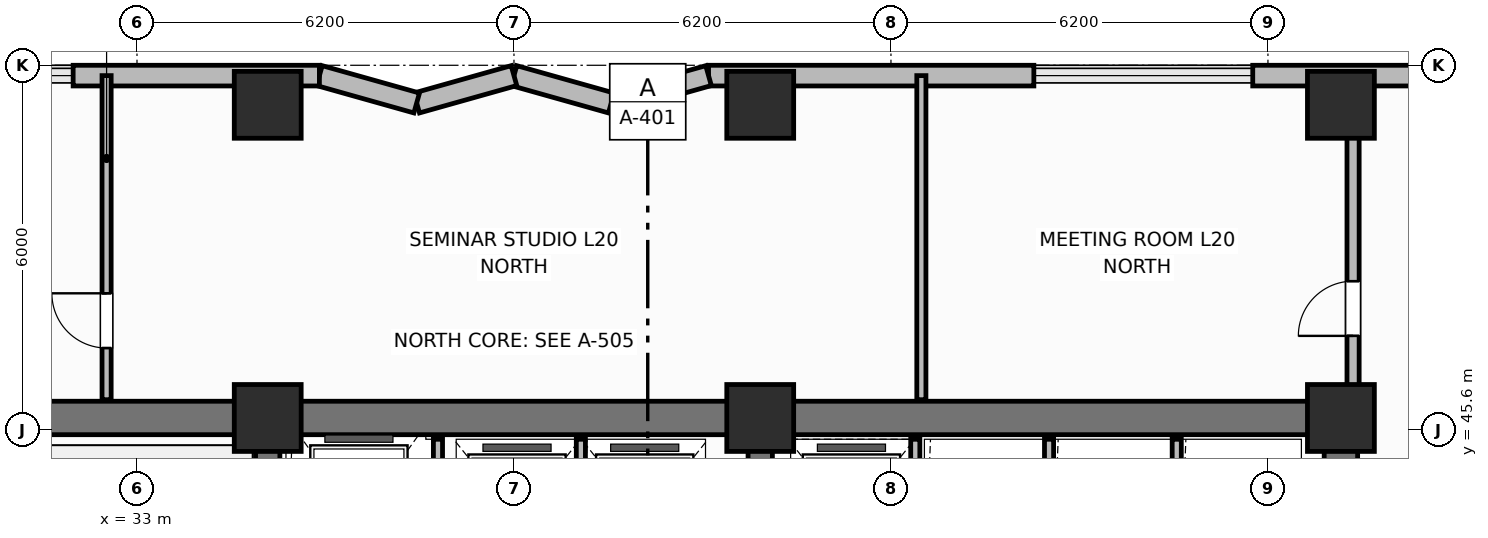
"""IFC4 building model, lengths in metres.
Left out: names, types, materials, properties, quantities, classifications, styles, units other than length and angle.
Written with IfcOpenShell. Run it as: python <this file> out.ifc"""

import sys

from ifc_helpers import new_model, si_unit, direction, frame, frame_2d, origin, origin_2d, place, context, subcontext, project, spatial, rectangle, extrude, element, fill, save


model = new_model("IFC4")
c1 = context("Model", 3, precision=1e-05, world=origin(), true_north=direction((0.0, 1.0)))
c2 = subcontext(c1, "Body", "Model", "MODEL_VIEW")
j1 = project(units=[si_unit("LENGTHUNIT", "METRE"), si_unit("PLANEANGLEUNIT", "RADIAN")], contexts=[c1])
p1 = place(None, origin())
s1 = spatial("IfcSite", under=j1, at=p1, CompositionType="ELEMENT")
p2 = place(p1, origin())
s2 = spatial("IfcBuilding", under=s1, at=p2, CompositionType="ELEMENT")
p3 = place(p2, frame((0.0, 0.0, 84.1)))
s3 = spatial("IfcBuildingStorey", under=s2, at=p3, CompositionType="ELEMENT", Elevation=84.1)
p4 = place(p3, frame((25.6, 45.8, 0.0), z_axis=(0.0, 0.0, 1.0), x_axis=(1.0, 0.0, 0.0)))
e1 = element("IfcWall", 1, at=p4, inside=s3, PredefinedType="SHEAR", context=c2, shape_type="SweptSolid", body=[
    extrude(rectangle(XDim=27.2, YDim=0.55, at=frame_2d((13.6, 0.0))), origin(), (0.0, 0.0, 1.0), 4.2),
])
p5 = place(p3, frame((52.8, 39.875, 0.0), z_axis=(0.0, 0.0, 1.0), x_axis=(0.0, 1.0, 0.0)))
e2 = element("IfcWall", 2, at=p5, inside=s3, PredefinedType="SHEAR", context=c2, shape_type="SweptSolid", body=[
    extrude(rectangle(XDim=5.65, YDim=0.55, at=frame_2d((2.825, 0.0))), origin(), (0.0, 0.0, 1.0), 4.2),
])
for number, where, z_axis, x_axis in (
    (3, (35.15, 39.875, 0.0), (0.0, 0.0, 1.0), (0.0, 1.0, 0.0)),
    (4, (43.25, 39.875, 0.0), (0.0, 0.0, 1.0), (0.0, 1.0, 0.0)),
):
    element("IfcWall", number, at=place(p3, frame(where, z_axis=z_axis, x_axis=x_axis)), inside=s3, PredefinedType="SHEAR", context=c2, shape_type="SweptSolid", body=[
        extrude(rectangle(XDim=5.65, YDim=0.4, at=frame_2d((2.825, 0.0))), origin(), (0.0, 0.0, 1.0), 4.2),
    ])
for number, where, z_axis, x_axis in (
    (5, (35.15, 45.8, 0.0), (0.0, 0.0, 1.0), (1.0, 0.0, 0.0)),
    (6, (43.25, 45.8, 0.0), (0.0, 0.0, 1.0), (1.0, 0.0, 0.0)),
    (7, (52.8, 45.8, 0.0), (0.0, 0.0, 1.0), (1.0, 0.0, 0.0)),
    (8, (35.15, 50.95, 0.0), (0.0, 0.0, 1.0), (1.0, 0.0, 0.0)),
    (9, (43.25, 50.95, 0.0), (0.0, 0.0, 1.0), (1.0, 0.0, 0.0)),
    (10, (52.8, 50.95, 0.0), (0.0, 0.0, 1.0), (1.0, 0.0, 0.0)),
):
    element("IfcColumn", number, at=place(p3, frame(where, z_axis=z_axis, x_axis=x_axis)), inside=s3, PredefinedType="COLUMN", context=c2, shape_type="SweptSolid", body=[
        extrude(rectangle(XDim=1.1, YDim=1.1, at=origin_2d()), origin(), (0.0, 0.0, 1.0), 4.2),
    ])
p6 = place(p3, frame((59.8, 51.43, 0.0), z_axis=(0.0, 0.0, 1.0), x_axis=(-1.0, 0.0, 0.0)))
e11 = element("IfcWall", 11, at=p6, inside=s3, PredefinedType="SOLIDWALL", context=c2, shape_type="SweptSolid", body=[
    extrude(rectangle(XDim=8.45, YDim=0.34, at=frame_2d((4.225, 0.0))), origin(), (0.0, 0.0, 1.0), 3.2),
])
p7 = place(p6, frame((1.887, 0.0, 0.95)))
e12 = element("IfcOpeningElement", 12, at=p7, cuts=e11, PredefinedType="OPENING", context=c2, shape_type="SweptSolid", body=[
    extrude(rectangle(XDim=1.1, YDim=1.65, at=frame_2d((0.55, 0.825))), frame((0.0, 0.18, 0.0), z_axis=(0.0, -1.0, 0.0), x_axis=(1.0, 0.0, 0.0)), (0.0, 0.0, 1.0), 0.36),
])
p8 = place(p3, frame((47.75, 51.43, 0.0), z_axis=(0.0, 0.0, 1.0), x_axis=(-1.0, 0.0, 0.0)))
e13 = element("IfcWall", 13, at=p8, inside=s3, PredefinedType="SOLIDWALL", context=c2, shape_type="SweptSolid", body=[
    extrude(rectangle(XDim=5.35, YDim=0.34, at=frame_2d((2.675, 0.0))), origin(), (0.0, 0.0, 1.0), 3.2),
])
p9 = place(p3, frame((42.4, 51.43, 0.0), z_axis=(0.0, 0.0, 1.0), x_axis=(-0.962652136636, -0.270741322725, 0.0)))
e14 = element("IfcWall", 14, at=p9, inside=s3, PredefinedType="SOLIDWALL", context=c2, shape_type="SweptSolid", body=[
    extrude(rectangle(XDim=1.662, YDim=0.34, at=frame_2d((0.831, 0.0))), origin(), (0.0, 0.0, 1.0), 3.2),
])
p10 = place(p3, frame((40.8, 50.98, 0.0), z_axis=(0.0, 0.0, 1.0), x_axis=(-0.962662902433, 0.270703040766, 0.0)))
e15 = element("IfcWall", 15, at=p10, inside=s3, PredefinedType="SOLIDWALL", context=c2, shape_type="SweptSolid", body=[
    extrude(rectangle(XDim=1.662, YDim=0.34, at=frame_2d((0.831, 0.0))), origin(), (0.0, 0.0, 1.0), 3.2),
])
p11 = place(p3, frame((39.2, 51.43, 0.0), z_axis=(0.0, 0.0, 1.0), x_axis=(-0.962652136636, -0.270741322725, 0.0)))
e16 = element("IfcWall", 16, at=p11, inside=s3, PredefinedType="SOLIDWALL", context=c2, shape_type="SweptSolid", body=[
    extrude(rectangle(XDim=1.662, YDim=0.34, at=frame_2d((0.831, 0.0))), origin(), (0.0, 0.0, 1.0), 3.2),
])
p12 = place(p3, frame((37.6, 50.98, 0.0), z_axis=(0.0, 0.0, 1.0), x_axis=(-0.962662902433, 0.270703040766, 0.0)))
e17 = element("IfcWall", 17, at=p12, inside=s3, PredefinedType="SOLIDWALL", context=c2, shape_type="SweptSolid", body=[
    extrude(rectangle(XDim=1.662, YDim=0.34, at=frame_2d((0.831, 0.0))), origin(), (0.0, 0.0, 1.0), 3.2),
])
p13 = place(p3, frame((36.0, 51.43, 0.0), z_axis=(0.0, 0.0, 1.0), x_axis=(-1.0, 0.0, 0.0)))
e18 = element("IfcWall", 18, at=p13, inside=s3, PredefinedType="SOLIDWALL", context=c2, shape_type="SweptSolid", body=[
    extrude(rectangle(XDim=4.05, YDim=0.34, at=frame_2d((2.025, 0.0))), origin(), (0.0, 0.0, 1.0), 3.2),
])
p14 = place(p3, frame((37.95, 42.6, 0.0), z_axis=(0.0, 0.0, 1.0), x_axis=(0.0, 1.0, 0.0)))
e19 = element("IfcWall", 19, at=p14, inside=s3, PredefinedType="PARTITIONING", context=c2, shape_type="SweptSolid", body=[
    extrude(rectangle(XDim=2.85, YDim=0.15, at=frame_2d((1.425, 0.0))), origin(), (0.0, 0.0, 1.0), 3.03),
])
for number, where, z_axis, x_axis in (
    (20, (40.3, 42.65, 0.0), (0.0, 0.0, 1.0), (0.0, 1.0, 0.0)),
    (21, (45.8, 42.65, 0.0), (0.0, 0.0, 1.0), (0.0, 1.0, 0.0)),
    (22, (48.0, 42.65, 0.0), (0.0, 0.0, 1.0), (0.0, 1.0, 0.0)),
    (23, (50.1, 42.65, 0.0), (0.0, 0.0, 1.0), (0.0, 1.0, 0.0)),
):
    element("IfcWall", number, at=place(p3, frame(where, z_axis=z_axis, x_axis=x_axis)), inside=s3, PredefinedType="PARTITIONING", context=c2, shape_type="SweptSolid", body=[
        extrude(rectangle(XDim=2.8, YDim=0.15, at=frame_2d((1.4, 0.0))), origin(), (0.0, 0.0, 1.0), 3.03),
    ])
p15 = place(p3, frame((32.5, 46.1, 0.0), z_axis=(0.0, 0.0, 1.0), x_axis=(0.0, 1.0, 0.0)))
e24 = element("IfcWall", 24, at=p15, inside=s3, PredefinedType="PARTITIONING", context=c2, shape_type="SweptSolid", body=[
    extrude(rectangle(XDim=5.33, YDim=0.15, at=frame_2d((2.665, 0.0))), origin(), (0.0, 0.0, 1.0), 3.03),
])
p16 = place(p15, frame((0.85, 0.0, 0.0)))
e25 = element("IfcOpeningElement", 25, at=p16, cuts=e24, PredefinedType="OPENING", context=c2, shape_type="SweptSolid", body=[
    extrude(rectangle(XDim=0.9, YDim=2.1, at=frame_2d((0.45, 1.05))), frame((0.0, 0.085, 0.0), z_axis=(0.0, -1.0, 0.0), x_axis=(1.0, 0.0, 0.0)), (0.0, 0.0, 1.0), 0.17),
])
p17 = place(p3, frame((45.9, 46.1, 0.0), z_axis=(0.0, 0.0, 1.0), x_axis=(0.0, 1.0, 0.0)))
e26 = element("IfcWall", 26, at=p17, inside=s3, PredefinedType="PARTITIONING", context=c2, shape_type="SweptSolid", body=[
    extrude(rectangle(XDim=5.33, YDim=0.15, at=frame_2d((2.665, 0.0))), origin(), (0.0, 0.0, 1.0), 3.03),
])
p18 = place(p3, frame((53.0, 46.1, 0.0), z_axis=(0.0, 0.0, 1.0), x_axis=(0.0, 1.0, 0.0)))
e27 = element("IfcWall", 27, at=p18, inside=s3, PredefinedType="PARTITIONING", context=c2, shape_type="SweptSolid", body=[
    extrude(rectangle(XDim=4.78, YDim=0.2, at=frame_2d((2.39, 0.0))), origin(), (0.0, 0.0, 1.0), 3.03),
])
p19 = place(p18, frame((1.05, 0.0, 0.0)))
e28 = element("IfcOpeningElement", 28, at=p19, cuts=e27, PredefinedType="OPENING", context=c2, shape_type="SweptSolid", body=[
    extrude(rectangle(XDim=0.9, YDim=2.1, at=frame_2d((0.45, 1.05))), frame((0.0, 0.11, 0.0), z_axis=(0.0, -1.0, 0.0), x_axis=(1.0, 0.0, 0.0)), (0.0, 0.0, 1.0), 0.22),
])
p20 = place(p16, origin())
e29 = element("IfcDoor", 29, at=p20, inside=s3, OperationType="SINGLE_SWING_RIGHT", PredefinedType="DOOR", context=c2, shape_type="SweptSolid", body=[
    extrude(rectangle(XDim=0.9, YDim=2.1, at=frame_2d((0.45, 1.05))), frame((0.0, 0.025, 0.0), z_axis=(0.0, -1.0, 0.0), x_axis=(1.0, 0.0, 0.0)), (0.0, 0.0, 1.0), 0.05),
])
fill(e25, e29)
p21 = place(p19, origin())
e30 = element("IfcDoor", 30, at=p21, inside=s3, OperationType="SINGLE_SWING_LEFT", PredefinedType="DOOR", context=c2, shape_type="SweptSolid", body=[
    extrude(rectangle(XDim=0.9, YDim=2.1, at=frame_2d((0.45, 1.05))), frame((0.0, 0.025, 0.0), z_axis=(0.0, -1.0, 0.0), x_axis=(1.0, 0.0, 0.0)), (0.0, 0.0, 1.0), 0.05),
])
fill(e28, e30)
save(model, sys.argv[1])
